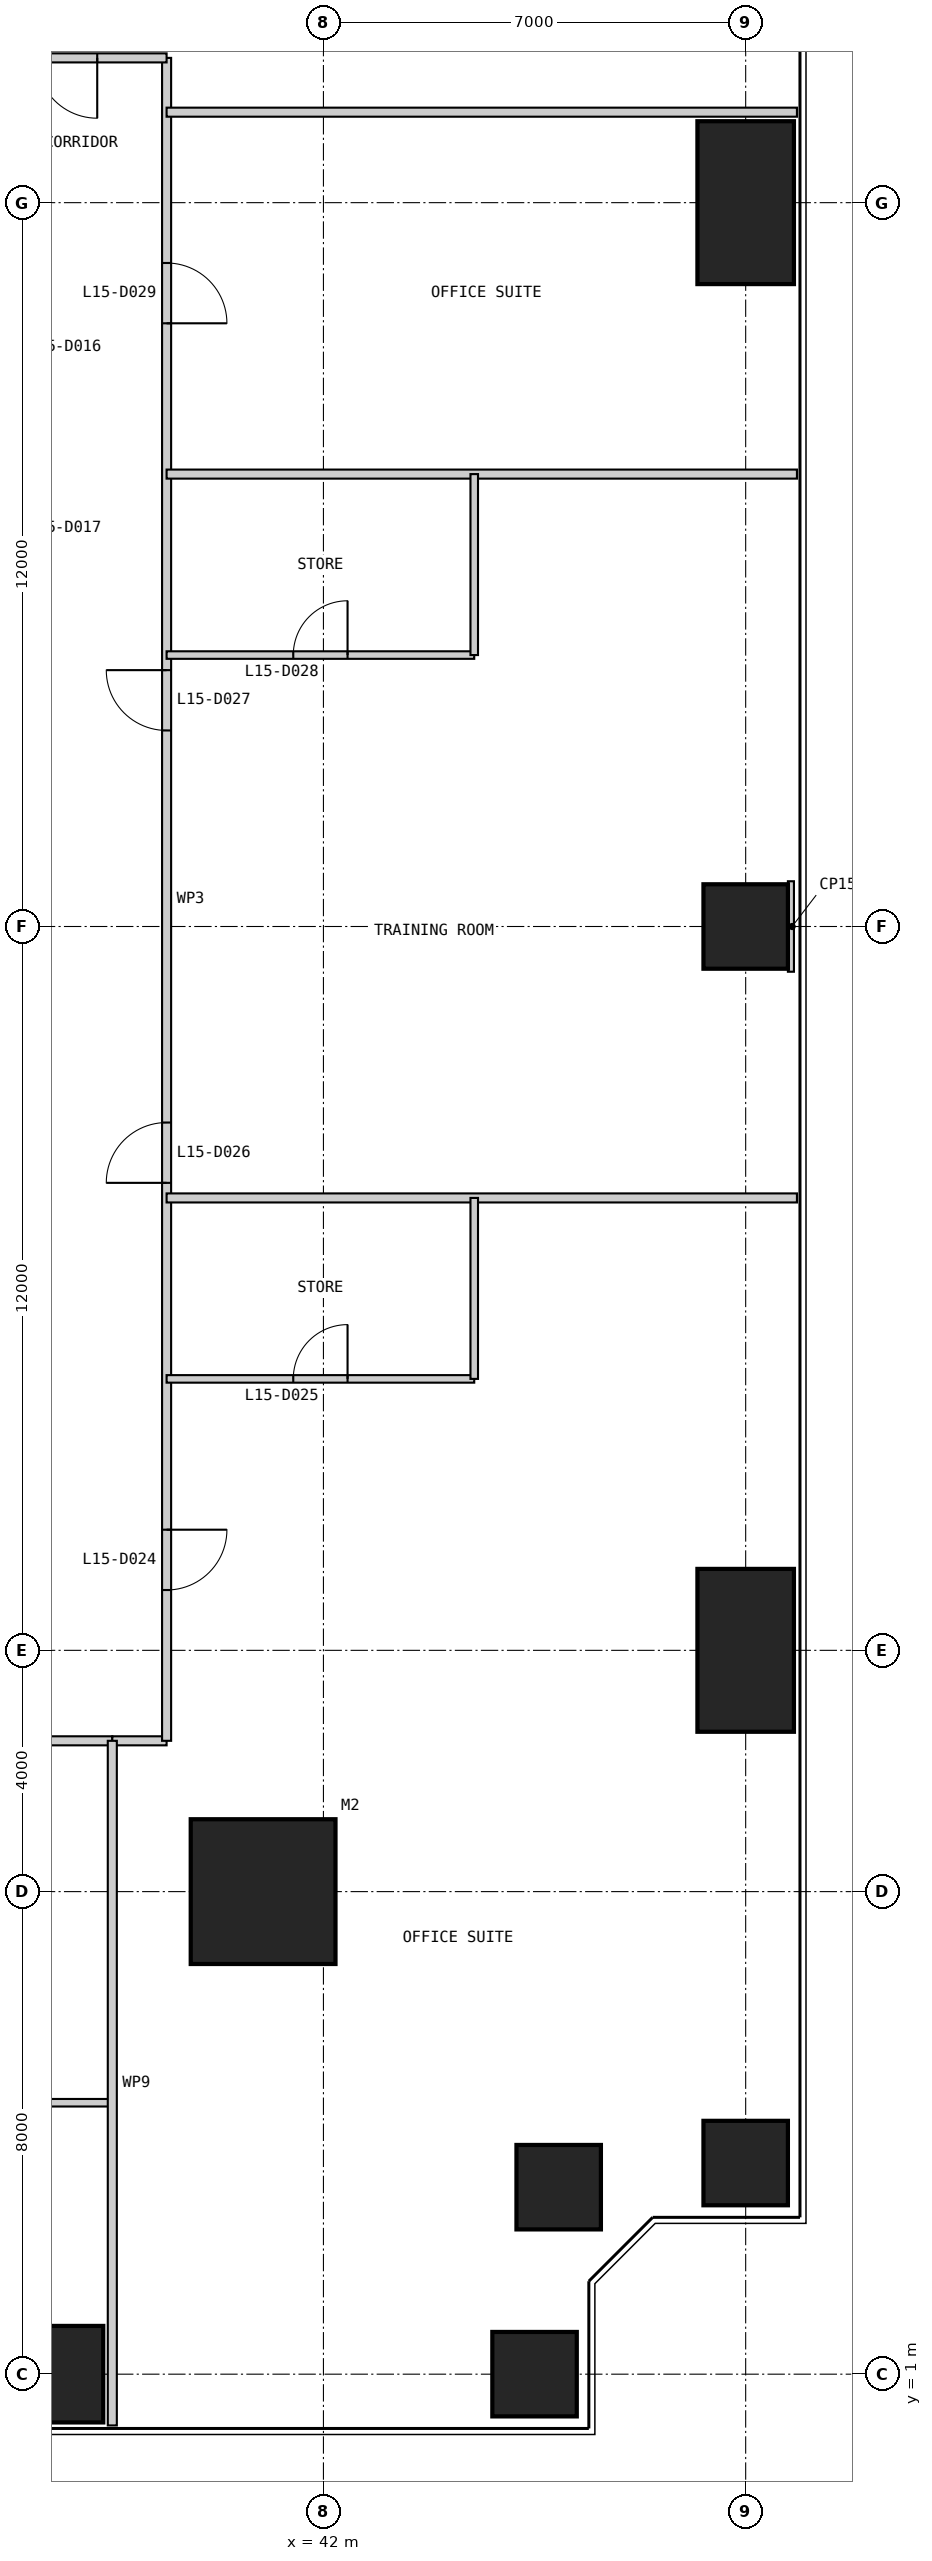
"""IFC4 building model, lengths in metres.
Left out: names, types, materials, properties, quantities, classifications, styles, units other than length and angle.
Written with IfcOpenShell. Run it as: python <this file> out.ifc"""

import sys

from ifc_helpers import new_model, si_unit, direction, frame, frame_2d, origin, origin_2d, place, context, subcontext, project, spatial, rectangle, extrude, element, fill, save


model = new_model("IFC4")
c1 = context("Model", 3, precision=1e-05, world=origin(), true_north=direction((0.0, 1.0)))
c2 = subcontext(c1, "Body", "Model", "MODEL_VIEW")
j1 = project(units=[si_unit("LENGTHUNIT", "METRE"), si_unit("PLANEANGLEUNIT", "RADIAN")], contexts=[c1])
p1 = place(None, origin())
s1 = spatial("IfcSite", under=j1, at=p1, CompositionType="ELEMENT")
p2 = place(p1, origin())
s2 = spatial("IfcBuilding", under=s1, at=p2, CompositionType="ELEMENT")
p3 = place(p2, frame((0.0, 0.0, 67.0)))
s3 = spatial("IfcBuildingStorey", under=s2, at=p3, CompositionType="ELEMENT", Elevation=67.0)
p4 = place(p3, frame((41.0, 9.0, 0.0), z_axis=(0.0, 0.0, 1.0), x_axis=(1.0, 0.0, 0.0)))
e1 = element("IfcColumn", 1, at=p4, inside=s3, PredefinedType="COLUMN", context=c2, shape_type="SweptSolid", body=[
    extrude(rectangle(XDim=2.4, YDim=2.4, at=origin_2d()), origin(), (0.0, 0.0, 1.0), 4.0),
])
p5 = place(p3, frame((37.0, 1.0, 0.0), z_axis=(0.0, 0.0, 1.0), x_axis=(1.0, 0.0, 0.0)))
e2 = element("IfcColumn", 2, at=p5, inside=s3, PredefinedType="COLUMN", context=c2, shape_type="SweptSolid", body=[
    extrude(rectangle(XDim=2.7, YDim=1.6, at=origin_2d()), origin(), (0.0, 0.0, 1.0), 4.0),
])
for number, where, z_axis, x_axis in (
    (3, (45.5, 1.0, 0.0), (0.0, 0.0, 1.0), (1.0, 0.0, 0.0)),
    (4, (45.9, 4.1, 0.0), (0.0, 0.0, 1.0), (1.0, 0.0, 0.0)),
    (5, (49.0, 4.5, 0.0), (0.0, 0.0, 1.0), (1.0, 0.0, 0.0)),
):
    element("IfcColumn", number, at=place(p3, frame(where, z_axis=z_axis, x_axis=x_axis)), inside=s3, PredefinedType="COLUMN", context=c2, shape_type="SweptSolid", body=[
        extrude(rectangle(XDim=1.4, YDim=1.4, at=origin_2d()), origin(), (0.0, 0.0, 1.0), 4.0),
    ])
p6 = place(p3, frame((49.0, 13.0, 0.0), z_axis=(0.0, 0.0, 1.0), x_axis=(1.0, 0.0, 0.0)))
e6 = element("IfcColumn", 6, at=p6, inside=s3, PredefinedType="COLUMN", context=c2, shape_type="SweptSolid", body=[
    extrude(rectangle(XDim=1.6, YDim=2.7, at=origin_2d()), origin(), (0.0, 0.0, 1.0), 4.0),
])
p7 = place(p3, frame((49.0, 25.0, 0.0), z_axis=(0.0, 0.0, 1.0), x_axis=(1.0, 0.0, 0.0)))
e7 = element("IfcColumn", 7, at=p7, inside=s3, PredefinedType="COLUMN", context=c2, shape_type="SweptSolid", body=[
    extrude(rectangle(XDim=1.4, YDim=1.4, at=origin_2d()), origin(), (0.0, 0.0, 1.0), 4.0),
])
p8 = place(p3, frame((49.0, 37.0, 0.0), z_axis=(0.0, 0.0, 1.0), x_axis=(1.0, 0.0, 0.0)))
e8 = element("IfcColumn", 8, at=p8, inside=s3, PredefinedType="COLUMN", context=c2, shape_type="SweptSolid", body=[
    extrude(rectangle(XDim=1.6, YDim=2.7, at=origin_2d()), origin(), (0.0, 0.0, 1.0), 4.0),
])
p9 = place(p3, frame((11.5, 11.5, 0.0), z_axis=(0.0, 0.0, 1.0), x_axis=(1.0, 0.0, 0.0)))
e9 = element("IfcWall", 9, at=p9, inside=s3, PredefinedType="PARTITIONING", context=c2, shape_type="SweptSolid", body=[
    extrude(rectangle(XDim=27.0, YDim=0.15, at=frame_2d((13.5, 0.0))), origin(), (0.0, 0.0, 1.0), 3.85),
])
p10 = place(p9, frame((1.0, 0.0, 0.0)))
e10 = element("IfcOpeningElement", 10, at=p10, cuts=e9, PredefinedType="OPENING", context=c2, shape_type="SweptSolid", body=[
    extrude(rectangle(XDim=1.0, YDim=2.2, at=frame_2d((0.5, 1.1))), frame((0.0, 0.085, 0.0), z_axis=(0.0, -1.0, 0.0), x_axis=(1.0, 0.0, 0.0)), (0.0, 0.0, 1.0), 0.17),
])
p11 = place(p9, frame((5.5, 0.0, 0.0)))
e11 = element("IfcOpeningElement", 11, at=p11, cuts=e9, PredefinedType="OPENING", context=c2, shape_type="SweptSolid", body=[
    extrude(rectangle(XDim=1.0, YDim=2.2, at=frame_2d((0.5, 1.1))), frame((0.0, 0.085, 0.0), z_axis=(0.0, -1.0, 0.0), x_axis=(1.0, 0.0, 0.0)), (0.0, 0.0, 1.0), 0.17),
])
p12 = place(p9, frame((11.5, 0.0, 0.0)))
e12 = element("IfcOpeningElement", 12, at=p12, cuts=e9, PredefinedType="OPENING", context=c2, shape_type="SweptSolid", body=[
    extrude(rectangle(XDim=1.0, YDim=2.2, at=frame_2d((0.5, 1.1))), frame((0.0, 0.085, 0.0), z_axis=(0.0, -1.0, 0.0), x_axis=(1.0, 0.0, 0.0)), (0.0, 0.0, 1.0), 0.17),
])
p13 = place(p9, frame((19.0, 0.0, 0.0)))
e13 = element("IfcOpeningElement", 13, at=p13, cuts=e9, PredefinedType="OPENING", context=c2, shape_type="SweptSolid", body=[
    extrude(rectangle(XDim=1.0, YDim=2.2, at=frame_2d((0.5, 1.1))), frame((0.0, 0.085, 0.0), z_axis=(0.0, -1.0, 0.0), x_axis=(1.0, 0.0, 0.0)), (0.0, 0.0, 1.0), 0.17),
])
p14 = place(p3, frame((32.5, 5.5, 0.0), z_axis=(0.0, 0.0, 1.0), x_axis=(1.0, 0.0, 0.0)))
e14 = element("IfcWall", 14, at=p14, inside=s3, PredefinedType="PARTITIONING", context=c2, shape_type="SweptSolid", body=[
    extrude(rectangle(XDim=6.0, YDim=0.125, at=frame_2d((3.0, 0.0))), origin(), (0.0, 0.0, 1.0), 3.85),
])
p15 = place(p3, frame((38.5, 11.5, 0.0), z_axis=(0.0, 0.0, 1.0), x_axis=(1.0, 0.0, 0.0)))
e15 = element("IfcWall", 15, at=p15, inside=s3, PredefinedType="PARTITIONING", context=c2, shape_type="SweptSolid", body=[
    extrude(rectangle(XDim=0.9, YDim=0.15, at=frame_2d((0.45, 0.0))), origin(), (0.0, 0.0, 1.0), 3.85),
])
p16 = place(p3, frame((39.4, 11.5, 0.0), z_axis=(0.0, 0.0, 1.0), x_axis=(0.0, 1.0, 0.0)))
e16 = element("IfcWall", 16, at=p16, inside=s3, PredefinedType="PARTITIONING", context=c2, shape_type="SweptSolid", body=[
    extrude(rectangle(XDim=27.9, YDim=0.15, at=frame_2d((13.95, 0.0))), origin(), (0.0, 0.0, 1.0), 3.85),
])
p17 = place(p16, frame((2.5, 0.0, 0.0)))
e17 = element("IfcOpeningElement", 17, at=p17, cuts=e16, PredefinedType="OPENING", context=c2, shape_type="SweptSolid", body=[
    extrude(rectangle(XDim=1.0, YDim=2.2, at=frame_2d((0.5, 1.1))), frame((0.0, 0.085, 0.0), z_axis=(0.0, -1.0, 0.0), x_axis=(1.0, 0.0, 0.0)), (0.0, 0.0, 1.0), 0.17),
])
p18 = place(p16, frame((9.25, 0.0, 0.0)))
e18 = element("IfcOpeningElement", 18, at=p18, cuts=e16, PredefinedType="OPENING", context=c2, shape_type="SweptSolid", body=[
    extrude(rectangle(XDim=1.0, YDim=2.2, at=frame_2d((0.5, 1.1))), frame((0.0, 0.085, 0.0), z_axis=(0.0, -1.0, 0.0), x_axis=(1.0, 0.0, 0.0)), (0.0, 0.0, 1.0), 0.17),
])
p19 = place(p16, frame((16.75, 0.0, 0.0)))
e19 = element("IfcOpeningElement", 19, at=p19, cuts=e16, PredefinedType="OPENING", context=c2, shape_type="SweptSolid", body=[
    extrude(rectangle(XDim=1.0, YDim=2.2, at=frame_2d((0.5, 1.1))), frame((0.0, 0.085, 0.0), z_axis=(0.0, -1.0, 0.0), x_axis=(1.0, 0.0, 0.0)), (0.0, 0.0, 1.0), 0.17),
])
p20 = place(p16, frame((23.5, 0.0, 0.0)))
e20 = element("IfcOpeningElement", 20, at=p20, cuts=e16, PredefinedType="OPENING", context=c2, shape_type="SweptSolid", body=[
    extrude(rectangle(XDim=1.0, YDim=2.2, at=frame_2d((0.5, 1.1))), frame((0.0, 0.085, 0.0), z_axis=(0.0, -1.0, 0.0), x_axis=(1.0, 0.0, 0.0)), (0.0, 0.0, 1.0), 0.17),
])
p21 = place(p3, frame((38.5, 0.15, 0.0), z_axis=(0.0, 0.0, 1.0), x_axis=(0.0, 1.0, 0.0)))
e21 = element("IfcWall", 21, at=p21, inside=s3, PredefinedType="PARTITIONING", context=c2, shape_type="SweptSolid", body=[
    extrude(rectangle(XDim=11.35, YDim=0.15, at=frame_2d((5.675, 0.0))), origin(), (0.0, 0.0, 1.0), 3.85),
])
p22 = place(p3, frame((44.5, 17.5, 0.0), z_axis=(0.0, 0.0, 1.0), x_axis=(-1.0, 0.0, 0.0)))
e22 = element("IfcWall", 22, at=p22, inside=s3, PredefinedType="PARTITIONING", context=c2, shape_type="SweptSolid", body=[
    extrude(rectangle(XDim=5.1, YDim=0.125, at=frame_2d((2.55, 0.0))), origin(), (0.0, 0.0, 1.0), 3.85),
])
p23 = place(p22, frame((2.1, 0.0, 0.0)))
e23 = element("IfcOpeningElement", 23, at=p23, cuts=e22, PredefinedType="OPENING", context=c2, shape_type="SweptSolid", body=[
    extrude(rectangle(XDim=0.9, YDim=2.2, at=frame_2d((0.45, 1.1))), frame((0.0, 0.073, 0.0), z_axis=(0.0, -1.0, 0.0), x_axis=(1.0, 0.0, 0.0)), (0.0, 0.0, 1.0), 0.145),
])
p24 = place(p3, frame((49.85, 20.5, 0.0), z_axis=(0.0, 0.0, 1.0), x_axis=(-1.0, 0.0, 0.0)))
e24 = element("IfcWall", 24, at=p24, inside=s3, PredefinedType="PARTITIONING", context=c2, shape_type="SweptSolid", body=[
    extrude(rectangle(XDim=10.45, YDim=0.15, at=frame_2d((5.225, 0.0))), origin(), (0.0, 0.0, 1.0), 3.85),
])
p25 = place(p3, frame((44.5, 29.5, 0.0), z_axis=(0.0, 0.0, 1.0), x_axis=(-1.0, 0.0, 0.0)))
e25 = element("IfcWall", 25, at=p25, inside=s3, PredefinedType="PARTITIONING", context=c2, shape_type="SweptSolid", body=[
    extrude(rectangle(XDim=5.1, YDim=0.125, at=frame_2d((2.55, 0.0))), origin(), (0.0, 0.0, 1.0), 3.85),
])
p26 = place(p25, frame((2.1, 0.0, 0.0)))
e26 = element("IfcOpeningElement", 26, at=p26, cuts=e25, PredefinedType="OPENING", context=c2, shape_type="SweptSolid", body=[
    extrude(rectangle(XDim=0.9, YDim=2.2, at=frame_2d((0.45, 1.1))), frame((0.0, 0.073, 0.0), z_axis=(0.0, -1.0, 0.0), x_axis=(1.0, 0.0, 0.0)), (0.0, 0.0, 1.0), 0.145),
])
p27 = place(p3, frame((49.85, 32.5, 0.0), z_axis=(0.0, 0.0, 1.0), x_axis=(-1.0, 0.0, 0.0)))
e27 = element("IfcWall", 27, at=p27, inside=s3, PredefinedType="PARTITIONING", context=c2, shape_type="SweptSolid", body=[
    extrude(rectangle(XDim=10.45, YDim=0.15, at=frame_2d((5.225, 0.0))), origin(), (0.0, 0.0, 1.0), 3.85),
])
for number, where, z_axis, x_axis in (
    (28, (44.5, 17.5, 0.0), (0.0, 0.0, 1.0), (0.0, 1.0, 0.0)),
    (29, (44.5, 29.5, 0.0), (0.0, 0.0, 1.0), (0.0, 1.0, 0.0)),
):
    element("IfcWall", number, at=place(p3, frame(where, z_axis=z_axis, x_axis=x_axis)), inside=s3, PredefinedType="PARTITIONING", context=c2, shape_type="SweptSolid", body=[
        extrude(rectangle(XDim=3.0, YDim=0.125, at=frame_2d((1.5, 0.0))), origin(), (0.0, 0.0, 1.0), 3.85),
    ])
p28 = place(p3, frame((39.4, 39.4, 0.0), z_axis=(0.0, 0.0, 1.0), x_axis=(-1.0, 0.0, 0.0)))
e30 = element("IfcWall", 30, at=p28, inside=s3, PredefinedType="PARTITIONING", context=c2, shape_type="SweptSolid", body=[
    extrude(rectangle(XDim=27.9, YDim=0.15, at=frame_2d((13.95, 0.0))), origin(), (0.0, 0.0, 1.0), 3.85),
])
p29 = place(p28, frame((1.15, 0.0, 0.0)))
e31 = element("IfcOpeningElement", 31, at=p29, cuts=e30, PredefinedType="OPENING", context=c2, shape_type="SweptSolid", body=[
    extrude(rectangle(XDim=1.0, YDim=2.2, at=frame_2d((0.5, 1.1))), frame((0.0, 0.085, 0.0), z_axis=(0.0, -1.0, 0.0), x_axis=(1.0, 0.0, 0.0)), (0.0, 0.0, 1.0), 0.17),
])
p30 = place(p28, frame((23.65, 0.0, 0.0)))
e32 = element("IfcOpeningElement", 32, at=p30, cuts=e30, PredefinedType="OPENING", context=c2, shape_type="SweptSolid", body=[
    extrude(rectangle(XDim=1.0, YDim=2.2, at=frame_2d((0.5, 1.1))), frame((0.0, 0.085, 0.0), z_axis=(0.0, -1.0, 0.0), x_axis=(1.0, 0.0, 0.0)), (0.0, 0.0, 1.0), 0.17),
])
p31 = place(p3, frame((49.85, 38.5, 0.0), z_axis=(0.0, 0.0, 1.0), x_axis=(-1.0, 0.0, 0.0)))
e33 = element("IfcWall", 33, at=p31, inside=s3, PredefinedType="PARTITIONING", context=c2, shape_type="SweptSolid", body=[
    extrude(rectangle(XDim=10.45, YDim=0.15, at=frame_2d((5.225, 0.0))), origin(), (0.0, 0.0, 1.0), 3.85),
])
p32 = place(p3, frame((49.8, 25.0, 0.0), z_axis=(0.0, 0.0, 1.0), x_axis=(-1.0, 0.0, 0.0)))
e34 = element("IfcWall", 34, at=p32, inside=s3, PredefinedType="PARTITIONING", context=c2, shape_type="SweptSolid", body=[
    extrude(rectangle(XDim=0.1, YDim=1.5, at=frame_2d((0.05, 0.0))), origin(), (0.0, 0.0, 1.0), 3.85),
])
p33 = place(p17, frame((1.0, 0.0, 0.0), z_axis=(0.0, 0.0, 1.0), x_axis=(-1.0, 0.0, 0.0)))
e35 = element("IfcDoor", 35, at=p33, inside=s3, OperationType="SINGLE_SWING_LEFT", PredefinedType="DOOR", context=c2, shape_type="SweptSolid", body=[
    extrude(rectangle(XDim=1.0, YDim=2.2, at=frame_2d((0.5, 1.1))), frame((0.0, 0.025, 0.0), z_axis=(0.0, -1.0, 0.0), x_axis=(1.0, 0.0, 0.0)), (0.0, 0.0, 1.0), 0.05),
])
fill(e17, e35)
p34 = place(p23, frame((0.9, 0.0, 0.0), z_axis=(0.0, 0.0, 1.0), x_axis=(-1.0, 0.0, 0.0)))
e36 = element("IfcDoor", 36, at=p34, inside=s3, OperationType="SINGLE_SWING_RIGHT", PredefinedType="DOOR", context=c2, shape_type="SweptSolid", body=[
    extrude(rectangle(XDim=0.9, YDim=2.2, at=frame_2d((0.45, 1.1))), frame((0.0, 0.025, 0.0), z_axis=(0.0, -1.0, 0.0), x_axis=(1.0, 0.0, 0.0)), (0.0, 0.0, 1.0), 0.05),
])
fill(e23, e36)
p35 = place(p18, origin())
e37 = element("IfcDoor", 37, at=p35, inside=s3, OperationType="SINGLE_SWING_LEFT", PredefinedType="DOOR", context=c2, shape_type="SweptSolid", body=[
    extrude(rectangle(XDim=1.0, YDim=2.2, at=frame_2d((0.5, 1.1))), frame((0.0, 0.025, 0.0), z_axis=(0.0, -1.0, 0.0), x_axis=(1.0, 0.0, 0.0)), (0.0, 0.0, 1.0), 0.05),
])
fill(e18, e37)
p36 = place(p19, origin())
e38 = element("IfcDoor", 38, at=p36, inside=s3, OperationType="SINGLE_SWING_RIGHT", PredefinedType="DOOR", context=c2, shape_type="SweptSolid", body=[
    extrude(rectangle(XDim=1.0, YDim=2.2, at=frame_2d((0.5, 1.1))), frame((0.0, 0.025, 0.0), z_axis=(0.0, -1.0, 0.0), x_axis=(1.0, 0.0, 0.0)), (0.0, 0.0, 1.0), 0.05),
])
fill(e19, e38)
p37 = place(p26, frame((0.9, 0.0, 0.0), z_axis=(0.0, 0.0, 1.0), x_axis=(-1.0, 0.0, 0.0)))
e39 = element("IfcDoor", 39, at=p37, inside=s3, OperationType="SINGLE_SWING_RIGHT", PredefinedType="DOOR", context=c2, shape_type="SweptSolid", body=[
    extrude(rectangle(XDim=0.9, YDim=2.2, at=frame_2d((0.45, 1.1))), frame((0.0, 0.025, 0.0), z_axis=(0.0, -1.0, 0.0), x_axis=(1.0, 0.0, 0.0)), (0.0, 0.0, 1.0), 0.05),
])
fill(e26, e39)
p38 = place(p20, frame((1.0, 0.0, 0.0), z_axis=(0.0, 0.0, 1.0), x_axis=(-1.0, 0.0, 0.0)))
e40 = element("IfcDoor", 40, at=p38, inside=s3, OperationType="SINGLE_SWING_RIGHT", PredefinedType="DOOR", context=c2, shape_type="SweptSolid", body=[
    extrude(rectangle(XDim=1.0, YDim=2.2, at=frame_2d((0.5, 1.1))), frame((0.0, 0.025, 0.0), z_axis=(0.0, -1.0, 0.0), x_axis=(1.0, 0.0, 0.0)), (0.0, 0.0, 1.0), 0.05),
])
fill(e20, e40)
p39 = place(p29, origin())
e41 = element("IfcDoor", 41, at=p39, inside=s3, OperationType="SINGLE_SWING_LEFT", PredefinedType="DOOR", context=c2, shape_type="SweptSolid", body=[
    extrude(rectangle(XDim=1.0, YDim=2.2, at=frame_2d((0.5, 1.1))), frame((0.0, 0.025, 0.0), z_axis=(0.0, -1.0, 0.0), x_axis=(1.0, 0.0, 0.0)), (0.0, 0.0, 1.0), 0.05),
])
fill(e31, e41)
save(model, sys.argv[1])
